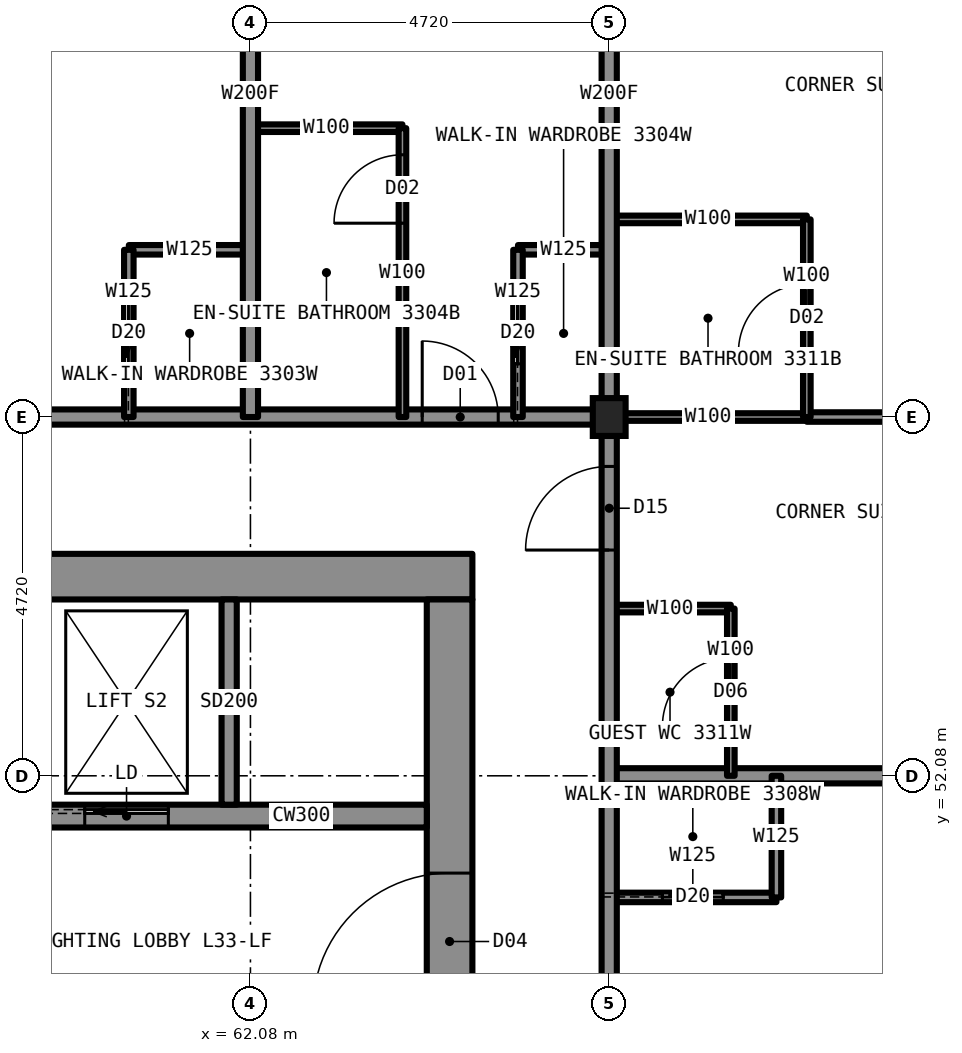
"""IFC4 building model, lengths in metres.
Left out: names, types, materials, properties, quantities, classifications, styles, units other than length and angle.
Written with IfcOpenShell. Run it as: python <this file> out.ifc"""

import sys

from ifc_helpers import new_model, si_unit, direction, frame, frame_2d, origin, origin_2d, place, context, subcontext, project, spatial, rectangle, i_section, extrude, element, fill, save


model = new_model("IFC4")
c1 = context("Model", 3, precision=1e-05, world=origin(), true_north=direction((0.0, 1.0)))
c2 = subcontext(c1, "Body", "Model", "MODEL_VIEW")
j1 = project(units=[si_unit("LENGTHUNIT", "METRE"), si_unit("PLANEANGLEUNIT", "RADIAN")], contexts=[c1])
p1 = place(None, origin())
s1 = spatial("IfcSite", under=j1, at=p1, CompositionType="ELEMENT")
p2 = place(p1, origin())
s2 = spatial("IfcBuilding", under=s1, at=p2, CompositionType="ELEMENT")
p3 = place(p2, frame((0.0, 0.0, 124.9)))
s3 = spatial("IfcBuildingStorey", under=s2, at=p3, CompositionType="ELEMENT", Elevation=124.9)
p4 = place(p3, frame((66.8, 56.8, 0.0), z_axis=(0.0, 0.0, 1.0), x_axis=(1.0, 0.0, 0.0)))
e1 = element("IfcColumn", 1, at=p4, inside=s3, PredefinedType="COLUMN", context=c2, shape_type="SweptSolid", body=[
    extrude(i_section(OverallWidth=0.432, OverallDepth=0.498, WebThickness=0.056, FlangeThickness=0.089, at=origin_2d()), origin(), (0.0, 0.0, 1.0), 3.5),
])
p5 = place(p3, frame((45.0, 54.7, 0.0), z_axis=(0.0, 0.0, 1.0), x_axis=(1.0, 0.0, 0.0)))
e2 = element("IfcWall", 2, at=p5, inside=s3, PredefinedType="SHEAR", context=c2, shape_type="SweptSolid", body=[
    extrude(rectangle(XDim=20.0, YDim=0.6, at=frame_2d((10.0, 0.0))), origin(), (0.0, 0.0, 1.0), 3.5),
])
p6 = place(p3, frame((64.7, 35.6, 0.0), z_axis=(0.0, 0.0, 1.0), x_axis=(0.0, 1.0, 0.0)))
e3 = element("IfcWall", 3, at=p6, inside=s3, PredefinedType="SHEAR", context=c2, shape_type="SweptSolid", body=[
    extrude(rectangle(XDim=18.8, YDim=0.6, at=frame_2d((9.4, 0.0))), origin(), (0.0, 0.0, 1.0), 3.5),
])
p7 = place(p6, frame((13.4, 0.0, 0.0)))
e4 = element("IfcOpeningElement", 4, at=p7, cuts=e3, PredefinedType="OPENING", context=c2, shape_type="SweptSolid", body=[
    extrude(rectangle(XDim=1.8, YDim=2.2, at=frame_2d((0.9, 1.1))), frame((0.0, 0.31, 0.0), z_axis=(0.0, -1.0, 0.0), x_axis=(1.0, 0.0, 0.0)), (0.0, 0.0, 1.0), 0.62),
])
p8 = place(p6, frame((3.6, 0.0, 0.0)))
e5 = element("IfcOpeningElement", 5, at=p8, cuts=e3, PredefinedType="OPENING", context=c2, shape_type="SweptSolid", body=[
    extrude(rectangle(XDim=1.8, YDim=2.2, at=frame_2d((0.9, 1.1))), frame((0.0, 0.31, 0.0), z_axis=(0.0, -1.0, 0.0), x_axis=(1.0, 0.0, 0.0)), (0.0, 0.0, 1.0), 0.62),
])
p9 = place(p3, frame((45.6, 51.55, 0.0), z_axis=(0.0, 0.0, 1.0), x_axis=(1.0, 0.0, 0.0)))
e6 = element("IfcWall", 6, at=p9, inside=s3, PredefinedType="SHEAR", context=c2, shape_type="SweptSolid", body=[
    extrude(rectangle(XDim=18.8, YDim=0.3, at=frame_2d((9.4, 0.0))), origin(), (0.0, 0.0, 1.0), 3.5),
])
p10 = place(p9, frame((0.7, 0.0, 0.0)))
e7 = element("IfcOpeningElement", 7, at=p10, cuts=e6, PredefinedType="OPENING", context=c2, shape_type="SweptSolid", body=[
    extrude(rectangle(XDim=1.1, YDim=2.2, at=frame_2d((0.55, 1.1))), frame((0.0, 0.16, 0.0), z_axis=(0.0, -1.0, 0.0), x_axis=(1.0, 0.0, 0.0)), (0.0, 0.0, 1.0), 0.32),
])
p11 = place(p9, frame((3.4, 0.0, 0.0)))
e8 = element("IfcOpeningElement", 8, at=p11, cuts=e6, PredefinedType="OPENING", context=c2, shape_type="SweptSolid", body=[
    extrude(rectangle(XDim=1.1, YDim=2.2, at=frame_2d((0.55, 1.1))), frame((0.0, 0.16, 0.0), z_axis=(0.0, -1.0, 0.0), x_axis=(1.0, 0.0, 0.0)), (0.0, 0.0, 1.0), 0.32),
])
p12 = place(p9, frame((6.1, 0.0, 0.0)))
e9 = element("IfcOpeningElement", 9, at=p12, cuts=e6, PredefinedType="OPENING", context=c2, shape_type="SweptSolid", body=[
    extrude(rectangle(XDim=1.1, YDim=2.2, at=frame_2d((0.55, 1.1))), frame((0.0, 0.16, 0.0), z_axis=(0.0, -1.0, 0.0), x_axis=(1.0, 0.0, 0.0)), (0.0, 0.0, 1.0), 0.32),
])
p13 = place(p9, frame((8.8, 0.0, 0.0)))
e10 = element("IfcOpeningElement", 10, at=p13, cuts=e6, PredefinedType="OPENING", context=c2, shape_type="SweptSolid", body=[
    extrude(rectangle(XDim=1.1, YDim=2.2, at=frame_2d((0.55, 1.1))), frame((0.0, 0.16, 0.0), z_axis=(0.0, -1.0, 0.0), x_axis=(1.0, 0.0, 0.0)), (0.0, 0.0, 1.0), 0.32),
])
p14 = place(p9, frame((11.6, 0.0, 0.0)))
e11 = element("IfcOpeningElement", 11, at=p14, cuts=e6, PredefinedType="OPENING", context=c2, shape_type="SweptSolid", body=[
    extrude(rectangle(XDim=1.1, YDim=2.2, at=frame_2d((0.55, 1.1))), frame((0.0, 0.16, 0.0), z_axis=(0.0, -1.0, 0.0), x_axis=(1.0, 0.0, 0.0)), (0.0, 0.0, 1.0), 0.32),
])
p15 = place(p9, frame((14.3, 0.0, 0.0)))
e12 = element("IfcOpeningElement", 12, at=p15, cuts=e6, PredefinedType="OPENING", context=c2, shape_type="SweptSolid", body=[
    extrude(rectangle(XDim=1.1, YDim=2.2, at=frame_2d((0.55, 1.1))), frame((0.0, 0.16, 0.0), z_axis=(0.0, -1.0, 0.0), x_axis=(1.0, 0.0, 0.0)), (0.0, 0.0, 1.0), 0.32),
])
p16 = place(p3, frame((66.8, 56.8, 0.0), z_axis=(0.0, 0.0, 1.0), x_axis=(1.0, 0.0, 0.0)))
e13 = element("IfcWall", 13, at=p16, inside=s3, PredefinedType="PARTITIONING", context=c2, shape_type="SweptSolid", body=[
    extrude(rectangle(XDim=2.6, YDim=0.1, at=frame_2d((1.3, 0.0))), origin(), (0.0, 0.0, 1.0), 2.573),
])
p17 = place(p3, frame((43.2, 56.8, 0.0), z_axis=(0.0, 0.0, 1.0), x_axis=(1.0, 0.0, 0.0)))
e14 = element("IfcWall", 14, at=p17, inside=s3, PredefinedType="PARTITIONING", context=c2, shape_type="SweptSolid", body=[
    extrude(rectangle(XDim=23.6, YDim=0.2, at=frame_2d((11.8, 0.0))), origin(), (0.0, 0.0, 1.0), 3.33),
])
p18 = place(p17, frame((0.7, 0.0, 0.0)))
e15 = element("IfcOpeningElement", 15, at=p18, cuts=e14, PredefinedType="OPENING", context=c2, shape_type="SweptSolid", body=[
    extrude(rectangle(XDim=1.0, YDim=2.2, at=frame_2d((0.5, 1.1))), frame((0.0, 0.11, 0.0), z_axis=(0.0, -1.0, 0.0), x_axis=(1.0, 0.0, 0.0)), (0.0, 0.0, 1.0), 0.22),
])
p19 = place(p17, frame((5.12, 0.0, 0.0)))
e16 = element("IfcOpeningElement", 16, at=p19, cuts=e14, PredefinedType="OPENING", context=c2, shape_type="SweptSolid", body=[
    extrude(rectangle(XDim=1.0, YDim=2.2, at=frame_2d((0.5, 1.1))), frame((0.0, 0.11, 0.0), z_axis=(0.0, -1.0, 0.0), x_axis=(1.0, 0.0, 0.0)), (0.0, 0.0, 1.0), 0.22),
])
p20 = place(p17, frame((12.44, 0.0, 0.0)))
e17 = element("IfcOpeningElement", 17, at=p20, cuts=e14, PredefinedType="OPENING", context=c2, shape_type="SweptSolid", body=[
    extrude(rectangle(XDim=1.0, YDim=2.2, at=frame_2d((0.5, 1.1))), frame((0.0, 0.11, 0.0), z_axis=(0.0, -1.0, 0.0), x_axis=(1.0, 0.0, 0.0)), (0.0, 0.0, 1.0), 0.22),
])
p21 = place(p17, frame((21.14, 0.0, 0.0)))
e18 = element("IfcOpeningElement", 18, at=p21, cuts=e14, PredefinedType="OPENING", context=c2, shape_type="SweptSolid", body=[
    extrude(rectangle(XDim=1.0, YDim=2.2, at=frame_2d((0.5, 1.1))), frame((0.0, 0.11, 0.0), z_axis=(0.0, -1.0, 0.0), x_axis=(1.0, 0.0, 0.0)), (0.0, 0.0, 1.0), 0.22),
])
p22 = place(p3, frame((69.4, 56.8, 0.0), z_axis=(0.0, 0.0, 1.0), x_axis=(1.0, 0.0, 0.0)))
e19 = element("IfcWall", 19, at=p22, inside=s3, PredefinedType="PARTITIONING", context=c2, shape_type="SweptSolid", body=[
    extrude(rectangle(XDim=5.9, YDim=0.125, at=frame_2d((2.95, 0.0))), origin(), (0.0, 0.0, 1.0), 2.573),
])
p23 = place(p22, frame((1.15, 0.0, 0.0)))
e20 = element("IfcOpeningElement", 20, at=p23, cuts=e19, PredefinedType="OPENING", context=c2, shape_type="SweptSolid", body=[
    extrude(rectangle(XDim=0.9, YDim=2.2, at=frame_2d((0.45, 1.1))), frame((0.0, 0.073, 0.0), z_axis=(0.0, -1.0, 0.0), x_axis=(1.0, 0.0, 0.0)), (0.0, 0.0, 1.0), 0.145),
])
p24 = place(p3, frame((60.48, 59.0, 0.0), z_axis=(0.0, 0.0, 1.0), x_axis=(1.0, 0.0, 0.0)))
e21 = element("IfcWall", 21, at=p24, inside=s3, PredefinedType="PARTITIONING", context=c2, shape_type="SweptSolid", body=[
    extrude(rectangle(XDim=1.6, YDim=0.125, at=frame_2d((0.8, 0.0))), origin(), (0.0, 0.0, 1.0), 3.33),
])
p25 = place(p3, frame((65.6, 59.0, 0.0), z_axis=(0.0, 0.0, 1.0), x_axis=(1.0, 0.0, 0.0)))
e22 = element("IfcWall", 22, at=p25, inside=s3, PredefinedType="PARTITIONING", context=c2, shape_type="SweptSolid", body=[
    extrude(rectangle(XDim=1.2, YDim=0.125, at=frame_2d((0.6, 0.0))), origin(), (0.0, 0.0, 1.0), 3.33),
])
p26 = place(p3, frame((66.8, 59.4, 0.0), z_axis=(0.0, 0.0, 1.0), x_axis=(1.0, 0.0, 0.0)))
e23 = element("IfcWall", 23, at=p26, inside=s3, PredefinedType="PARTITIONING", context=c2, shape_type="SweptSolid", body=[
    extrude(rectangle(XDim=2.6, YDim=0.1, at=frame_2d((1.3, 0.0))), origin(), (0.0, 0.0, 1.0), 3.33),
])
p27 = place(p3, frame((62.08, 60.6, 0.0), z_axis=(0.0, 0.0, 1.0), x_axis=(1.0, 0.0, 0.0)))
e24 = element("IfcWall", 24, at=p27, inside=s3, PredefinedType="PARTITIONING", context=c2, shape_type="SweptSolid", body=[
    extrude(rectangle(XDim=2.0, YDim=0.1, at=frame_2d((1.0, 0.0))), origin(), (0.0, 0.0, 1.0), 3.33),
])
p28 = place(p3, frame((66.8, 50.48, 0.0), z_axis=(0.0, 0.0, 1.0), x_axis=(1.0, 0.0, 0.0)))
e25 = element("IfcWall", 25, at=p28, inside=s3, PredefinedType="PARTITIONING", context=c2, shape_type="SweptSolid", body=[
    extrude(rectangle(XDim=2.2, YDim=0.125, at=frame_2d((1.1, 0.0))), origin(), (0.0, 0.0, 1.0), 3.33),
])
p29 = place(p28, frame((0.7, 0.0, 0.0)))
e26 = element("IfcOpeningElement", 26, at=p29, cuts=e25, PredefinedType="OPENING", context=c2, shape_type="SweptSolid", body=[
    extrude(rectangle(XDim=0.8, YDim=2.1, at=frame_2d((0.4, 1.05))), frame((0.0, 0.073, 0.0), z_axis=(0.0, -1.0, 0.0), x_axis=(1.0, 0.0, 0.0)), (0.0, 0.0, 1.0), 0.145),
])
p30 = place(p3, frame((66.8, 52.08, 0.0), z_axis=(0.0, 0.0, 1.0), x_axis=(1.0, 0.0, 0.0)))
e27 = element("IfcWall", 27, at=p30, inside=s3, PredefinedType="PARTITIONING", context=c2, shape_type="SweptSolid", body=[
    extrude(rectangle(XDim=8.5, YDim=0.2, at=frame_2d((4.25, 0.0))), origin(), (0.0, 0.0, 1.0), 2.573),
])
p31 = place(p3, frame((66.8, 54.28, 0.0), z_axis=(0.0, 0.0, 1.0), x_axis=(1.0, 0.0, 0.0)))
e28 = element("IfcWall", 28, at=p31, inside=s3, PredefinedType="PARTITIONING", context=c2, shape_type="SweptSolid", body=[
    extrude(rectangle(XDim=1.6, YDim=0.1, at=frame_2d((0.8, 0.0))), origin(), (0.0, 0.0, 1.0), 3.33),
])
p32 = place(p3, frame((65.6, 56.8, 0.0), z_axis=(0.0, 0.0, 1.0), x_axis=(0.0, 1.0, 0.0)))
e29 = element("IfcWall", 29, at=p32, inside=s3, PredefinedType="PARTITIONING", context=c2, shape_type="SweptSolid", body=[
    extrude(rectangle(XDim=2.2, YDim=0.125, at=frame_2d((1.1, 0.0))), origin(), (0.0, 0.0, 1.0), 3.33),
])
p33 = place(p32, frame((0.7, 0.0, 0.0)))
e30 = element("IfcOpeningElement", 30, at=p33, cuts=e29, PredefinedType="OPENING", context=c2, shape_type="SweptSolid", body=[
    extrude(rectangle(XDim=0.8, YDim=2.1, at=frame_2d((0.4, 1.05))), frame((0.0, 0.073, 0.0), z_axis=(0.0, -1.0, 0.0), x_axis=(1.0, 0.0, 0.0)), (0.0, 0.0, 1.0), 0.145),
])
p34 = place(p3, frame((66.8, 33.22, 0.0), z_axis=(0.0, 0.0, 1.0), x_axis=(0.0, 1.0, 0.0)))
e31 = element("IfcWall", 31, at=p34, inside=s3, PredefinedType="PARTITIONING", context=c2, shape_type="SweptSolid", body=[
    extrude(rectangle(XDim=23.58, YDim=0.2, at=frame_2d((11.79, 0.0))), origin(), (0.0, 0.0, 1.0), 3.33),
])
p35 = place(p34, frame((7.85, 0.0, 0.0)))
e32 = element("IfcOpeningElement", 32, at=p35, cuts=e31, PredefinedType="OPENING", context=c2, shape_type="SweptSolid", body=[
    extrude(rectangle(XDim=1.0, YDim=2.2, at=frame_2d((0.5, 1.1))), frame((0.0, 0.11, 0.0), z_axis=(0.0, -1.0, 0.0), x_axis=(1.0, 0.0, 0.0)), (0.0, 0.0, 1.0), 0.22),
])
p36 = place(p34, frame((12.42, 0.0, 0.0)))
e33 = element("IfcOpeningElement", 33, at=p36, cuts=e31, PredefinedType="OPENING", context=c2, shape_type="SweptSolid", body=[
    extrude(rectangle(XDim=1.0, YDim=2.2, at=frame_2d((0.5, 1.1))), frame((0.0, 0.11, 0.0), z_axis=(0.0, -1.0, 0.0), x_axis=(1.0, 0.0, 0.0)), (0.0, 0.0, 1.0), 0.22),
])
p37 = place(p34, frame((21.83, 0.0, 0.0)))
e34 = element("IfcOpeningElement", 34, at=p37, cuts=e31, PredefinedType="OPENING", context=c2, shape_type="SweptSolid", body=[
    extrude(rectangle(XDim=1.1, YDim=2.2, at=frame_2d((0.55, 1.1))), frame((0.0, 0.11, 0.0), z_axis=(0.0, -1.0, 0.0), x_axis=(1.0, 0.0, 0.0)), (0.0, 0.0, 1.0), 0.22),
])
p38 = place(p34, frame((0.63, 0.0, 0.0)))
e35 = element("IfcOpeningElement", 35, at=p38, cuts=e31, PredefinedType="OPENING", context=c2, shape_type="SweptSolid", body=[
    extrude(rectangle(XDim=1.1, YDim=2.2, at=frame_2d((0.55, 1.1))), frame((0.0, 0.11, 0.0), z_axis=(0.0, -1.0, 0.0), x_axis=(1.0, 0.0, 0.0)), (0.0, 0.0, 1.0), 0.22),
])
p39 = place(p3, frame((66.8, 56.8, 0.0), z_axis=(0.0, 0.0, 1.0), x_axis=(0.0, 1.0, 0.0)))
e36 = element("IfcWall", 36, at=p39, inside=s3, PredefinedType="PARTITIONING", context=c2, shape_type="SweptSolid", body=[
    extrude(rectangle(XDim=8.5, YDim=0.2, at=frame_2d((4.25, 0.0))), origin(), (0.0, 0.0, 1.0), 2.573),
])
p40 = place(p3, frame((68.4, 52.08, 0.0), z_axis=(0.0, 0.0, 1.0), x_axis=(0.0, 1.0, 0.0)))
e37 = element("IfcWall", 37, at=p40, inside=s3, PredefinedType="PARTITIONING", context=c2, shape_type="SweptSolid", body=[
    extrude(rectangle(XDim=2.2, YDim=0.1, at=frame_2d((1.1, 0.0))), origin(), (0.0, 0.0, 1.0), 3.33),
])
p41 = place(p40, frame((0.65, 0.0, 0.0)))
e38 = element("IfcOpeningElement", 38, at=p41, cuts=e37, PredefinedType="OPENING", context=c2, shape_type="SweptSolid", body=[
    extrude(rectangle(XDim=0.9, YDim=2.1, at=frame_2d((0.45, 1.05))), frame((0.0, 0.06, 0.0), z_axis=(0.0, -1.0, 0.0), x_axis=(1.0, 0.0, 0.0)), (0.0, 0.0, 1.0), 0.12),
])
p42 = place(p3, frame((69.0, 50.48, 0.0), z_axis=(0.0, 0.0, 1.0), x_axis=(0.0, 1.0, 0.0)))
e39 = element("IfcWall", 39, at=p42, inside=s3, PredefinedType="PARTITIONING", context=c2, shape_type="SweptSolid", body=[
    extrude(rectangle(XDim=1.6, YDim=0.125, at=frame_2d((0.8, 0.0))), origin(), (0.0, 0.0, 1.0), 3.33),
])
p43 = place(p3, frame((69.4, 56.8, 0.0), z_axis=(0.0, 0.0, 1.0), x_axis=(0.0, 1.0, 0.0)))
e40 = element("IfcWall", 40, at=p43, inside=s3, PredefinedType="PARTITIONING", context=c2, shape_type="SweptSolid", body=[
    extrude(rectangle(XDim=2.6, YDim=0.1, at=frame_2d((1.3, 0.0))), origin(), (0.0, 0.0, 1.0), 3.33),
])
p44 = place(p43, frame((0.85, 0.0, 0.0)))
e41 = element("IfcOpeningElement", 41, at=p44, cuts=e40, PredefinedType="OPENING", context=c2, shape_type="SweptSolid", body=[
    extrude(rectangle(XDim=0.9, YDim=2.1, at=frame_2d((0.45, 1.05))), frame((0.0, 0.06, 0.0), z_axis=(0.0, -1.0, 0.0), x_axis=(1.0, 0.0, 0.0)), (0.0, 0.0, 1.0), 0.12),
])
p45 = place(p3, frame((60.48, 56.8, 0.0), z_axis=(0.0, 0.0, 1.0), x_axis=(0.0, 1.0, 0.0)))
e42 = element("IfcWall", 42, at=p45, inside=s3, PredefinedType="PARTITIONING", context=c2, shape_type="SweptSolid", body=[
    extrude(rectangle(XDim=2.2, YDim=0.125, at=frame_2d((1.1, 0.0))), origin(), (0.0, 0.0, 1.0), 3.33),
])
p46 = place(p45, frame((0.7, 0.0, 0.0)))
e43 = element("IfcOpeningElement", 43, at=p46, cuts=e42, PredefinedType="OPENING", context=c2, shape_type="SweptSolid", body=[
    extrude(rectangle(XDim=0.8, YDim=2.1, at=frame_2d((0.4, 1.05))), frame((0.0, 0.073, 0.0), z_axis=(0.0, -1.0, 0.0), x_axis=(1.0, 0.0, 0.0)), (0.0, 0.0, 1.0), 0.145),
])
p47 = place(p3, frame((62.08, 56.8, 0.0), z_axis=(0.0, 0.0, 1.0), x_axis=(0.0, 1.0, 0.0)))
e44 = element("IfcWall", 44, at=p47, inside=s3, PredefinedType="PARTITIONING", context=c2, shape_type="SweptSolid", body=[
    extrude(rectangle(XDim=8.5, YDim=0.2, at=frame_2d((4.25, 0.0))), origin(), (0.0, 0.0, 1.0), 2.573),
])
p48 = place(p3, frame((64.08, 56.8, 0.0), z_axis=(0.0, 0.0, 1.0), x_axis=(0.0, 1.0, 0.0)))
e45 = element("IfcWall", 45, at=p48, inside=s3, PredefinedType="PARTITIONING", context=c2, shape_type="SweptSolid", body=[
    extrude(rectangle(XDim=3.8, YDim=0.1, at=frame_2d((1.9, 0.0))), origin(), (0.0, 0.0, 1.0), 3.33),
])
p49 = place(p48, frame((2.55, 0.0, 0.0)))
e46 = element("IfcOpeningElement", 46, at=p49, cuts=e45, PredefinedType="OPENING", context=c2, shape_type="SweptSolid", body=[
    extrude(rectangle(XDim=0.9, YDim=2.1, at=frame_2d((0.45, 1.05))), frame((0.0, 0.06, 0.0), z_axis=(0.0, -1.0, 0.0), x_axis=(1.0, 0.0, 0.0)), (0.0, 0.0, 1.0), 0.12),
])
p50 = place(p3, frame((61.8, 51.7, 0.0), z_axis=(0.0, 0.0, 1.0), x_axis=(0.0, 1.0, 0.0)))
e47 = element("IfcWall", 47, at=p50, inside=s3, PredefinedType="PARTITIONING", context=c2, shape_type="SweptSolid", body=[
    extrude(rectangle(XDim=2.7, YDim=0.2, at=frame_2d((1.35, 0.0))), origin(), (0.0, 0.0, 1.0), 3.33),
])
p51 = place(p46, origin())
e48 = element("IfcDoor", 48, at=p51, inside=s3, OperationType="SLIDING_TO_LEFT", PredefinedType="DOOR", context=c2, shape_type="SweptSolid", body=[
    extrude(rectangle(XDim=0.8, YDim=2.1, at=frame_2d((0.4, 1.05))), frame((0.0, 0.025, 0.0), z_axis=(0.0, -1.0, 0.0), x_axis=(1.0, 0.0, 0.0)), (0.0, 0.0, 1.0), 0.05),
])
fill(e43, e48)
p52 = place(p21, origin())
e49 = element("IfcDoor", 49, at=p52, inside=s3, OperationType="SINGLE_SWING_LEFT", PredefinedType="DOOR", context=c2, shape_type="SweptSolid", body=[
    extrude(rectangle(XDim=1.0, YDim=2.2, at=frame_2d((0.5, 1.1))), frame((0.0, 0.025, 0.0), z_axis=(0.0, -1.0, 0.0), x_axis=(1.0, 0.0, 0.0)), (0.0, 0.0, 1.0), 0.05),
])
fill(e18, e49)
p53 = place(p49, origin())
e50 = element("IfcDoor", 50, at=p53, inside=s3, OperationType="SINGLE_SWING_RIGHT", PredefinedType="DOOR", context=c2, shape_type="SweptSolid", body=[
    extrude(rectangle(XDim=0.9, YDim=2.1, at=frame_2d((0.45, 1.05))), frame((0.0, 0.025, 0.0), z_axis=(0.0, -1.0, 0.0), x_axis=(1.0, 0.0, 0.0)), (0.0, 0.0, 1.0), 0.05),
])
fill(e46, e50)
p54 = place(p33, origin())
e51 = element("IfcDoor", 51, at=p54, inside=s3, OperationType="SLIDING_TO_LEFT", PredefinedType="DOOR", context=c2, shape_type="SweptSolid", body=[
    extrude(rectangle(XDim=0.8, YDim=2.1, at=frame_2d((0.4, 1.05))), frame((0.0, 0.025, 0.0), z_axis=(0.0, -1.0, 0.0), x_axis=(1.0, 0.0, 0.0)), (0.0, 0.0, 1.0), 0.05),
])
fill(e30, e51)
p55 = place(p29, origin())
e52 = element("IfcDoor", 52, at=p55, inside=s3, OperationType="SLIDING_TO_LEFT", PredefinedType="DOOR", context=c2, shape_type="SweptSolid", body=[
    extrude(rectangle(XDim=0.8, YDim=2.1, at=frame_2d((0.4, 1.05))), frame((0.0, 0.025, 0.0), z_axis=(0.0, -1.0, 0.0), x_axis=(1.0, 0.0, 0.0)), (0.0, 0.0, 1.0), 0.05),
])
fill(e26, e52)
p56 = place(p37, origin())
e53 = element("IfcDoor", 53, at=p56, inside=s3, OperationType="SINGLE_SWING_LEFT", PredefinedType="DOOR", context=c2, shape_type="SweptSolid", body=[
    extrude(rectangle(XDim=1.1, YDim=2.2, at=frame_2d((0.55, 1.1))), frame((0.0, 0.025, 0.0), z_axis=(0.0, -1.0, 0.0), x_axis=(1.0, 0.0, 0.0)), (0.0, 0.0, 1.0), 0.05),
])
fill(e34, e53)
p57 = place(p44, origin())
e54 = element("IfcDoor", 54, at=p57, inside=s3, OperationType="SINGLE_SWING_RIGHT", PredefinedType="DOOR", context=c2, shape_type="SweptSolid", body=[
    extrude(rectangle(XDim=0.9, YDim=2.1, at=frame_2d((0.45, 1.05))), frame((0.0, 0.025, 0.0), z_axis=(0.0, -1.0, 0.0), x_axis=(1.0, 0.0, 0.0)), (0.0, 0.0, 1.0), 0.05),
])
fill(e41, e54)
p58 = place(p41, origin())
e55 = element("IfcDoor", 55, at=p58, inside=s3, OperationType="SINGLE_SWING_LEFT", PredefinedType="DOOR", context=c2, shape_type="SweptSolid", body=[
    extrude(rectangle(XDim=0.9, YDim=2.1, at=frame_2d((0.45, 1.05))), frame((0.0, 0.025, 0.0), z_axis=(0.0, -1.0, 0.0), x_axis=(1.0, 0.0, 0.0)), (0.0, 0.0, 1.0), 0.05),
])
fill(e38, e55)
p59 = place(p7, origin())
e56 = element("IfcDoor", 56, at=p59, inside=s3, OperationType="DOUBLE_DOOR_SINGLE_SWING", PredefinedType="DOOR", context=c2, shape_type="SweptSolid", body=[
    extrude(rectangle(XDim=1.8, YDim=2.2, at=frame_2d((0.9, 1.1))), frame((0.0, 0.025, 0.0), z_axis=(0.0, -1.0, 0.0), x_axis=(1.0, 0.0, 0.0)), (0.0, 0.0, 1.0), 0.05),
])
fill(e4, e56)
p60 = place(p15, origin())
e57 = element("IfcDoor", 57, at=p60, inside=s3, OperationType="SLIDING_TO_LEFT", PredefinedType="DOOR", context=c2, shape_type="SweptSolid", body=[
    extrude(rectangle(XDim=1.1, YDim=2.2, at=frame_2d((0.55, 1.1))), frame((0.0, 0.025, 0.0), z_axis=(0.0, -1.0, 0.0), x_axis=(1.0, 0.0, 0.0)), (0.0, 0.0, 1.0), 0.05),
])
fill(e12, e57)
save(model, sys.argv[1])
